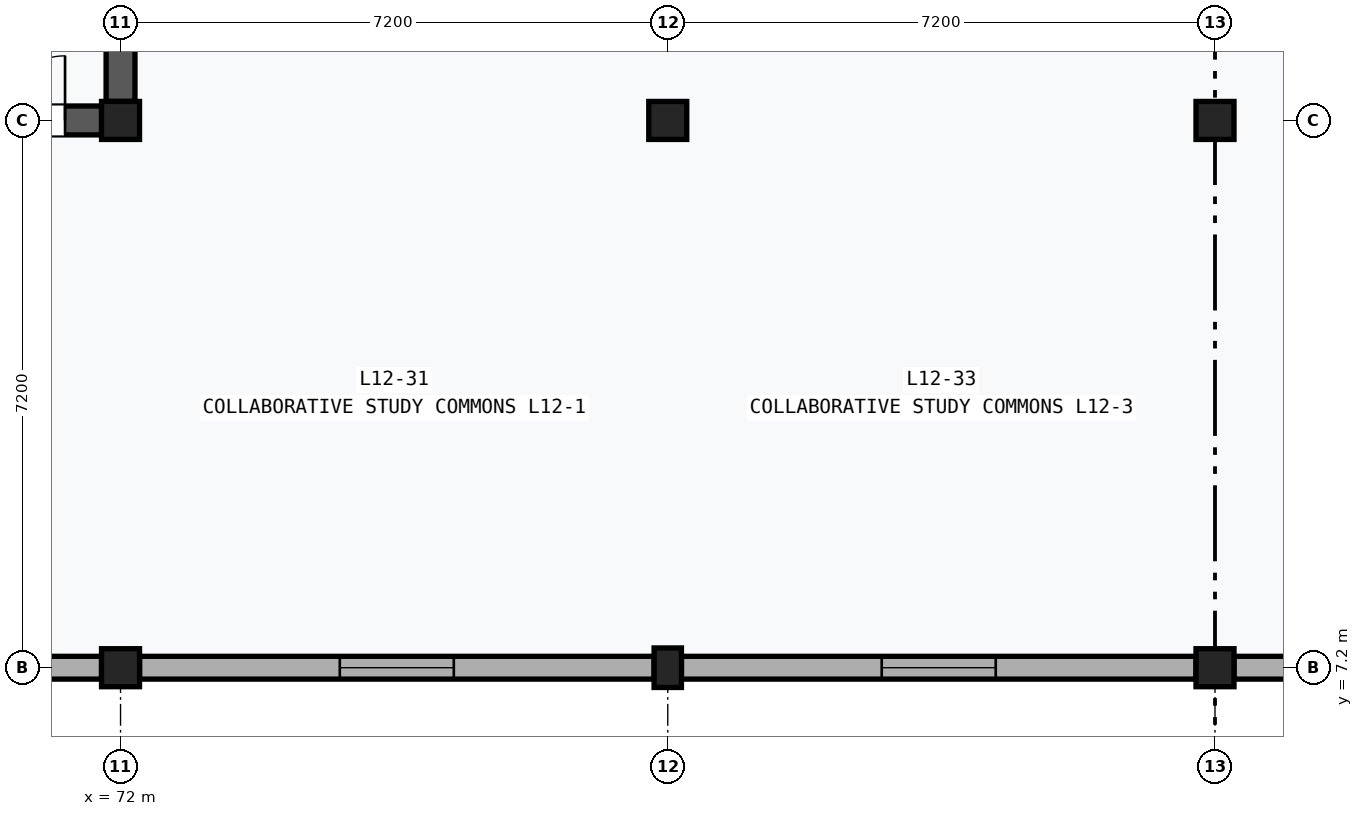
"""IFC4 building model, lengths in metres.
Left out: names, types, materials, properties, quantities, classifications, styles, units other than length and angle.
Written with IfcOpenShell. Run it as: python <this file> out.ifc"""

import sys

from ifc_helpers import new_model, si_unit, direction, frame, frame_2d, origin, origin_2d, place, context, subcontext, project, spatial, rectangle, extrude, element, fill, save


model = new_model("IFC4")
c1 = context("Model", 3, precision=1e-05, world=origin(), true_north=direction((0.0, 1.0)))
c2 = subcontext(c1, "Body", "Model", "MODEL_VIEW")
j1 = project(units=[si_unit("LENGTHUNIT", "METRE"), si_unit("PLANEANGLEUNIT", "RADIAN")], contexts=[c1])
p1 = place(None, origin())
s1 = spatial("IfcSite", under=j1, at=p1, CompositionType="ELEMENT")
p2 = place(p1, origin())
s2 = spatial("IfcBuilding", under=s1, at=p2, CompositionType="ELEMENT")
p3 = place(p2, frame((0.0, 0.0, 51.0)))
s3 = spatial("IfcBuildingStorey", under=s2, at=p3, CompositionType="ELEMENT", Elevation=51.0)
for number, where, z_axis, x_axis in (
    (1, (72.0, 7.2, 0.0), (0.0, 0.0, 1.0), (1.0, 0.0, 0.0)),
    (2, (72.0, 14.4, 0.0), (0.0, 0.0, 1.0), (1.0, 0.0, 0.0)),
):
    element("IfcColumn", number, at=place(p3, frame(where, z_axis=z_axis, x_axis=x_axis)), inside=s3, PredefinedType="COLUMN", context=c2, shape_type="SweptSolid", body=[
        extrude(rectangle(XDim=0.5, YDim=0.5, at=origin_2d()), origin(), (0.0, 0.0, 1.0), 4.0),
    ])
p4 = place(p3, frame((79.2, 7.2, 0.0), z_axis=(0.0, 0.0, 1.0), x_axis=(1.0, 0.0, 0.0)))
e3 = element("IfcColumn", 3, at=p4, inside=s3, PredefinedType="PILASTER", context=c2, shape_type="SweptSolid", body=[
    extrude(rectangle(XDim=0.36, YDim=0.52, at=origin_2d()), origin(), (0.0, 0.0, 1.0), 4.0),
])
for number, where, z_axis, x_axis in (
    (4, (79.2, 14.4, 0.0), (0.0, 0.0, 1.0), (1.0, 0.0, 0.0)),
    (5, (86.4, 7.2, 0.0), (0.0, 0.0, 1.0), (1.0, 0.0, 0.0)),
    (6, (86.4, 14.4, 0.0), (0.0, 0.0, 1.0), (1.0, 0.0, 0.0)),
):
    element("IfcColumn", number, at=place(p3, frame(where, z_axis=z_axis, x_axis=x_axis)), inside=s3, PredefinedType="COLUMN", context=c2, shape_type="SweptSolid", body=[
        extrude(rectangle(XDim=0.5, YDim=0.5, at=origin_2d()), origin(), (0.0, 0.0, 1.0), 4.0),
    ])
p5 = place(p3, frame((65.05, 7.2, 0.0), z_axis=(0.0, 0.0, 1.0), x_axis=(1.0, 0.0, 0.0)))
e7 = element("IfcWall", 7, at=p5, inside=s3, PredefinedType="SOLIDWALL", context=c2, shape_type="SweptSolid", body=[
    extrude(rectangle(XDim=6.7, YDim=0.3, at=frame_2d((3.35, 0.0))), origin(), (0.0, 0.0, 1.0), 3.17),
])
p6 = place(p5, frame((2.6, 0.0, 1.1)))
e8 = element("IfcOpeningElement", 8, at=p6, cuts=e7, PredefinedType="OPENING", context=c2, shape_type="SweptSolid", body=[
    extrude(rectangle(XDim=1.5, YDim=1.35, at=frame_2d((0.75, 0.675))), frame((0.0, 0.162, 0.0), z_axis=(0.0, -1.0, 0.0), x_axis=(1.0, 0.0, 0.0)), (0.0, 0.0, 1.0), 0.324),
])
p7 = place(p3, frame((72.25, 7.2, 0.0), z_axis=(0.0, 0.0, 1.0), x_axis=(1.0, 0.0, 0.0)))
e9 = element("IfcWall", 9, at=p7, inside=s3, PredefinedType="SOLIDWALL", context=c2, shape_type="SweptSolid", body=[
    extrude(rectangle(XDim=6.77, YDim=0.3, at=frame_2d((3.385, 0.0))), origin(), (0.0, 0.0, 1.0), 3.17),
])
p8 = place(p7, frame((2.635, 0.0, 1.1)))
e10 = element("IfcOpeningElement", 10, at=p8, cuts=e9, PredefinedType="OPENING", context=c2, shape_type="SweptSolid", body=[
    extrude(rectangle(XDim=1.5, YDim=1.35, at=frame_2d((0.75, 0.675))), frame((0.0, 0.162, 0.0), z_axis=(0.0, -1.0, 0.0), x_axis=(1.0, 0.0, 0.0)), (0.0, 0.0, 1.0), 0.324),
])
p9 = place(p3, frame((79.38, 7.2, 0.0), z_axis=(0.0, 0.0, 1.0), x_axis=(1.0, 0.0, 0.0)))
e11 = element("IfcWall", 11, at=p9, inside=s3, PredefinedType="SOLIDWALL", context=c2, shape_type="SweptSolid", body=[
    extrude(rectangle(XDim=6.77, YDim=0.3, at=frame_2d((3.385, 0.0))), origin(), (0.0, 0.0, 1.0), 3.17),
])
p10 = place(p9, frame((2.635, 0.0, 1.1)))
e12 = element("IfcOpeningElement", 12, at=p10, cuts=e11, PredefinedType="OPENING", context=c2, shape_type="SweptSolid", body=[
    extrude(rectangle(XDim=1.5, YDim=1.35, at=frame_2d((0.75, 0.675))), frame((0.0, 0.162, 0.0), z_axis=(0.0, -1.0, 0.0), x_axis=(1.0, 0.0, 0.0)), (0.0, 0.0, 1.0), 0.324),
])
p11 = place(p3, frame((86.65, 7.2, 0.0), z_axis=(0.0, 0.0, 1.0), x_axis=(1.0, 0.0, 0.0)))
e13 = element("IfcWall", 13, at=p11, inside=s3, PredefinedType="SOLIDWALL", context=c2, shape_type="SweptSolid", body=[
    extrude(rectangle(XDim=6.7, YDim=0.3, at=frame_2d((3.35, 0.0))), origin(), (0.0, 0.0, 1.0), 3.17),
])
p12 = place(p11, frame((2.45, 0.0, 0.9)))
e14 = element("IfcOpeningElement", 14, at=p12, cuts=e13, PredefinedType="OPENING", context=c2, shape_type="SweptSolid", body=[
    extrude(rectangle(XDim=1.8, YDim=1.8, at=frame_2d((0.9, 0.9))), frame((0.0, 0.162, 0.0), z_axis=(0.0, -1.0, 0.0), x_axis=(1.0, 0.0, 0.0)), (0.0, 0.0, 1.0), 0.324),
])
p13 = place(p3, frame((72.0, 14.65, 0.0), z_axis=(0.0, 0.0, 1.0), x_axis=(0.0, 1.0, 0.0)))
e15 = element("IfcWall", 15, at=p13, inside=s3, PredefinedType="SHEAR", context=c2, shape_type="SweptSolid", body=[
    extrude(rectangle(XDim=6.7, YDim=0.38, at=frame_2d((3.35, 0.0))), origin(), (0.0, 0.0, 1.0), 3.09),
])
p14 = place(p13, frame((2.2, 0.0, 0.0)))
e16 = element("IfcOpeningElement", 16, at=p14, cuts=e15, PredefinedType="OPENING", context=c2, shape_type="SweptSolid", body=[
    extrude(rectangle(XDim=1.7, YDim=2.25, at=frame_2d((0.85, 1.125))), frame((0.0, 0.202, 0.0), z_axis=(0.0, -1.0, 0.0), x_axis=(1.0, 0.0, 0.0)), (0.0, 0.0, 1.0), 0.404),
])
p15 = place(p3, frame((65.05, 14.4, 0.0), z_axis=(0.0, 0.0, 1.0), x_axis=(1.0, 0.0, 0.0)))
e17 = element("IfcWall", 17, at=p15, inside=s3, PredefinedType="SHEAR", context=c2, shape_type="SweptSolid", body=[
    extrude(rectangle(XDim=6.7, YDim=0.38, at=frame_2d((3.35, 0.0))), origin(), (0.0, 0.0, 1.0), 3.09),
])
p16 = place(p15, frame((4.52, 0.0, 0.0)))
e18 = element("IfcOpeningElement", 18, at=p16, cuts=e17, PredefinedType="OPENING", context=c2, shape_type="SweptSolid", body=[
    extrude(rectangle(XDim=1.7, YDim=2.25, at=frame_2d((0.85, 1.125))), frame((0.0, 0.202, 0.0), z_axis=(0.0, -1.0, 0.0), x_axis=(1.0, 0.0, 0.0)), (0.0, 0.0, 1.0), 0.404),
])
p17 = place(p8, origin())
e19 = element("IfcWindow", 19, at=p17, inside=s3, PartitioningType="SINGLE_PANEL", PredefinedType="WINDOW", context=c2, shape_type="SweptSolid", body=[
    extrude(rectangle(XDim=1.5, YDim=1.35, at=frame_2d((0.75, 0.675))), frame((0.0, 0.03, 0.0), z_axis=(0.0, -1.0, 0.0), x_axis=(1.0, 0.0, 0.0)), (0.0, 0.0, 1.0), 0.06),
])
fill(e10, e19)
p18 = place(p10, origin())
e20 = element("IfcWindow", 20, at=p18, inside=s3, PartitioningType="SINGLE_PANEL", PredefinedType="WINDOW", context=c2, shape_type="SweptSolid", body=[
    extrude(rectangle(XDim=1.5, YDim=1.35, at=frame_2d((0.75, 0.675))), frame((0.0, 0.03, 0.0), z_axis=(0.0, -1.0, 0.0), x_axis=(1.0, 0.0, 0.0)), (0.0, 0.0, 1.0), 0.06),
])
fill(e12, e20)
p19 = place(p16, origin())
e21 = element("IfcDoor", 21, at=p19, inside=s3, OperationType="DOUBLE_DOOR_SINGLE_SWING", PredefinedType="DOOR", context=c2, shape_type="SweptSolid", body=[
    extrude(rectangle(XDim=1.7, YDim=2.25, at=frame_2d((0.85, 1.125))), frame((0.0, 0.025, 0.0), z_axis=(0.0, -1.0, 0.0), x_axis=(1.0, 0.0, 0.0)), (0.0, 0.0, 1.0), 0.05),
])
fill(e18, e21)
save(model, sys.argv[1])
